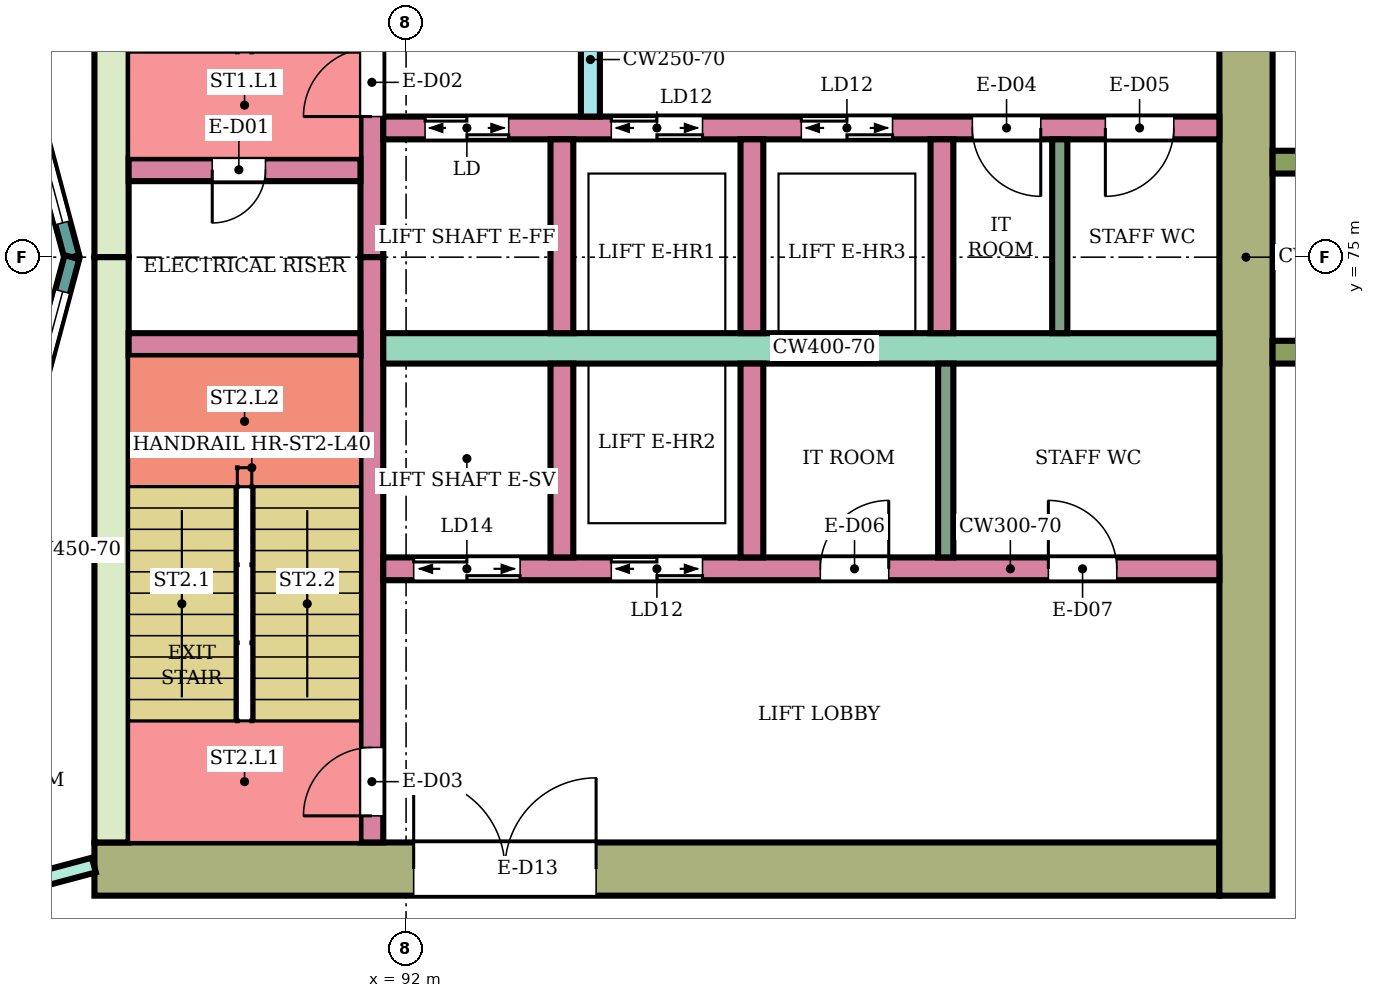
"""IFC4 building model, lengths in metres.
Left out: names, types, materials, properties, quantities, classifications, styles, units other than length and angle.
Written with IfcOpenShell. Run it as: python <this file> out.ifc"""

import sys

from ifc_helpers import new_model, si_unit, direction, frame, frame_2d, origin, place, context, subcontext, project, spatial, rectangle, extrude, element, fill, save


model = new_model("IFC4")
c1 = context("Model", 3, precision=1e-05, world=origin(), true_north=direction((0.0, 1.0)))
c2 = subcontext(c1, "Body", "Model", "MODEL_VIEW")
j1 = project(units=[si_unit("LENGTHUNIT", "METRE"), si_unit("PLANEANGLEUNIT", "RADIAN")], contexts=[c1])
p1 = place(None, origin())
s1 = spatial("IfcSite", under=j1, at=p1, CompositionType="ELEMENT")
p2 = place(p1, origin())
s2 = spatial("IfcBuilding", under=s1, at=p2, CompositionType="ELEMENT")
p3 = place(p2, frame((0.0, 0.0, 174.1)))
s3 = spatial("IfcBuildingStorey", under=s2, at=p3, CompositionType="ELEMENT", Elevation=174.1)
p4 = place(p3, frame((87.9, 66.95, 0.0), z_axis=(0.0, 0.0, 1.0), x_axis=(1.0, 0.0, 0.0)))
e1 = element("IfcWall", 1, at=p4, inside=s3, PredefinedType="SHEAR", context=c2, shape_type="SweptSolid", body=[
    extrude(rectangle(XDim=14.8, YDim=0.7, at=frame_2d((7.4, 0.0))), origin(), (0.0, 0.0, 1.0), 3.78),
])
p5 = place(p4, frame((4.2, 0.0, 0.0)))
e2 = element("IfcOpeningElement", 2, at=p5, cuts=e1, PredefinedType="OPENING", context=c2, shape_type="SweptSolid", body=[
    extrude(rectangle(XDim=2.4, YDim=2.4, at=frame_2d((1.2, 1.2))), frame((0.0, 0.36, 0.0), z_axis=(0.0, -1.0, 0.0), x_axis=(1.0, 0.0, 0.0)), (0.0, 0.0, 1.0), 0.72),
])
for number, where, z_axis, x_axis in (
    (3, (88.125, 75.0, 0.0), (0.0, 0.0, 1.0), (0.0, 1.0, 0.0)),
    (4, (88.125, 67.3, 0.0), (0.0, 0.0, 1.0), (0.0, 1.0, 0.0)),
):
    element("IfcWall", number, at=place(p3, frame(where, z_axis=z_axis, x_axis=x_axis)), inside=s3, PredefinedType="SHEAR", context=c2, shape_type="SweptSolid", body=[
        extrude(rectangle(XDim=7.7, YDim=0.45, at=frame_2d((3.85, 0.0))), origin(), (0.0, 0.0, 1.0), 3.78),
    ])
p6 = place(p3, frame((103.05, 66.6, 0.0), z_axis=(0.0, 0.0, 1.0), x_axis=(0.0, 1.0, 0.0)))
e5 = element("IfcWall", 5, at=p6, inside=s3, PredefinedType="SHEAR", context=c2, shape_type="SweptSolid", body=[
    extrude(rectangle(XDim=16.8, YDim=0.7, at=frame_2d((8.4, 0.0))), origin(), (0.0, 0.0, 1.0), 3.78),
])
p7 = place(p3, frame((91.55, 75.0, 0.0), z_axis=(0.0, 0.0, 1.0), x_axis=(0.0, 1.0, 0.0)))
e6 = element("IfcWall", 6, at=p7, inside=s3, PredefinedType="SHEAR", context=c2, shape_type="SweptSolid", body=[
    extrude(rectangle(XDim=7.7, YDim=0.3, at=frame_2d((3.85, 0.0))), origin(), (0.0, 0.0, 1.0), 3.78),
])
p8 = place(p7, frame((1.85, 0.0, 0.0)))
e7 = element("IfcOpeningElement", 7, at=p8, cuts=e6, PredefinedType="OPENING", context=c2, shape_type="SweptSolid", body=[
    extrude(rectangle(XDim=0.9, YDim=2.1, at=frame_2d((0.45, 1.05))), frame((0.0, 0.16, 0.0), z_axis=(0.0, -1.0, 0.0), x_axis=(1.0, 0.0, 0.0)), (0.0, 0.0, 1.0), 0.32),
])
p9 = place(p3, frame((91.55, 67.3, 0.0), z_axis=(0.0, 0.0, 1.0), x_axis=(0.0, 1.0, 0.0)))
e8 = element("IfcWall", 8, at=p9, inside=s3, PredefinedType="SHEAR", context=c2, shape_type="SweptSolid", body=[
    extrude(rectangle(XDim=7.7, YDim=0.3, at=frame_2d((3.85, 0.0))), origin(), (0.0, 0.0, 1.0), 3.78),
])
p10 = place(p9, frame((0.35, 0.0, 0.0)))
e9 = element("IfcOpeningElement", 9, at=p10, cuts=e8, PredefinedType="OPENING", context=c2, shape_type="SweptSolid", body=[
    extrude(rectangle(XDim=0.9, YDim=2.1, at=frame_2d((0.45, 1.05))), frame((0.0, 0.16, 0.0), z_axis=(0.0, -1.0, 0.0), x_axis=(1.0, 0.0, 0.0)), (0.0, 0.0, 1.0), 0.32),
])
p11 = place(p3, frame((88.35, 76.15, 0.0), z_axis=(0.0, 0.0, 1.0), x_axis=(1.0, 0.0, 0.0)))
e10 = element("IfcWall", 10, at=p11, inside=s3, PredefinedType="SHEAR", context=c2, shape_type="SweptSolid", body=[
    extrude(rectangle(XDim=3.05, YDim=0.3, at=frame_2d((1.525, 0.0))), origin(), (0.0, 0.0, 1.0), 3.78),
])
p12 = place(p11, frame((1.1, 0.0, 0.0)))
e11 = element("IfcOpeningElement", 11, at=p12, cuts=e10, PredefinedType="OPENING", context=c2, shape_type="SweptSolid", body=[
    extrude(rectangle(XDim=0.7, YDim=2.0, at=frame_2d((0.35, 1.0))), frame((0.0, 0.16, 0.0), z_axis=(0.0, -1.0, 0.0), x_axis=(1.0, 0.0, 0.0)), (0.0, 0.0, 1.0), 0.32),
])
p13 = place(p3, frame((88.35, 73.85, 0.0), z_axis=(0.0, 0.0, 1.0), x_axis=(1.0, 0.0, 0.0)))
e12 = element("IfcWall", 12, at=p13, inside=s3, PredefinedType="SHEAR", context=c2, shape_type="SweptSolid", body=[
    extrude(rectangle(XDim=3.05, YDim=0.3, at=frame_2d((1.525, 0.0))), origin(), (0.0, 0.0, 1.0), 3.78),
])
p14 = place(p3, frame((91.7, 76.7, 0.0), z_axis=(0.0, 0.0, 1.0), x_axis=(1.0, 0.0, 0.0)))
e13 = element("IfcWall", 13, at=p14, inside=s3, PredefinedType="SHEAR", context=c2, shape_type="SweptSolid", body=[
    extrude(rectangle(XDim=11.0, YDim=0.3, at=frame_2d((5.5, 0.0))), origin(), (0.0, 0.0, 1.0), 3.78),
])
p15 = place(p14, frame((0.55, 0.0, 0.0)))
e14 = element("IfcOpeningElement", 14, at=p15, cuts=e13, PredefinedType="OPENING", context=c2, shape_type="SweptSolid", body=[
    extrude(rectangle(XDim=1.1, YDim=2.1, at=frame_2d((0.55, 1.05))), frame((0.0, 0.16, 0.0), z_axis=(0.0, -1.0, 0.0), x_axis=(1.0, 0.0, 0.0)), (0.0, 0.0, 1.0), 0.32),
])
p16 = place(p14, frame((3.0, 0.0, 0.0)))
e15 = element("IfcOpeningElement", 15, at=p16, cuts=e13, PredefinedType="OPENING", context=c2, shape_type="SweptSolid", body=[
    extrude(rectangle(XDim=1.2, YDim=2.1, at=frame_2d((0.6, 1.05))), frame((0.0, 0.16, 0.0), z_axis=(0.0, -1.0, 0.0), x_axis=(1.0, 0.0, 0.0)), (0.0, 0.0, 1.0), 0.32),
])
p17 = place(p14, frame((5.5, 0.0, 0.0)))
e16 = element("IfcOpeningElement", 16, at=p17, cuts=e13, PredefinedType="OPENING", context=c2, shape_type="SweptSolid", body=[
    extrude(rectangle(XDim=1.2, YDim=2.1, at=frame_2d((0.6, 1.05))), frame((0.0, 0.16, 0.0), z_axis=(0.0, -1.0, 0.0), x_axis=(1.0, 0.0, 0.0)), (0.0, 0.0, 1.0), 0.32),
])
p18 = place(p14, frame((7.75, 0.0, 0.0)))
e17 = element("IfcOpeningElement", 17, at=p18, cuts=e13, PredefinedType="OPENING", context=c2, shape_type="SweptSolid", body=[
    extrude(rectangle(XDim=0.9, YDim=2.1, at=frame_2d((0.45, 1.05))), frame((0.0, 0.16, 0.0), z_axis=(0.0, -1.0, 0.0), x_axis=(1.0, 0.0, 0.0)), (0.0, 0.0, 1.0), 0.32),
])
p19 = place(p14, frame((9.5, 0.0, 0.0)))
e18 = element("IfcOpeningElement", 18, at=p19, cuts=e13, PredefinedType="OPENING", context=c2, shape_type="SweptSolid", body=[
    extrude(rectangle(XDim=0.9, YDim=2.1, at=frame_2d((0.45, 1.05))), frame((0.0, 0.16, 0.0), z_axis=(0.0, -1.0, 0.0), x_axis=(1.0, 0.0, 0.0)), (0.0, 0.0, 1.0), 0.32),
])
p20 = place(p3, frame((91.7, 73.8, 0.0), z_axis=(0.0, 0.0, 1.0), x_axis=(1.0, 0.0, 0.0)))
e19 = element("IfcWall", 19, at=p20, inside=s3, PredefinedType="SHEAR", context=c2, shape_type="SweptSolid", body=[
    extrude(rectangle(XDim=11.0, YDim=0.4, at=frame_2d((5.5, 0.0))), origin(), (0.0, 0.0, 1.0), 3.78),
])
p21 = place(p3, frame((91.7, 70.9, 0.0), z_axis=(0.0, 0.0, 1.0), x_axis=(1.0, 0.0, 0.0)))
e20 = element("IfcWall", 20, at=p21, inside=s3, PredefinedType="SHEAR", context=c2, shape_type="SweptSolid", body=[
    extrude(rectangle(XDim=11.0, YDim=0.3, at=frame_2d((5.5, 0.0))), origin(), (0.0, 0.0, 1.0), 3.78),
])
p22 = place(p21, frame((0.4, 0.0, 0.0)))
e21 = element("IfcOpeningElement", 21, at=p22, cuts=e20, PredefinedType="OPENING", context=c2, shape_type="SweptSolid", body=[
    extrude(rectangle(XDim=1.4, YDim=2.1, at=frame_2d((0.7, 1.05))), frame((0.0, 0.16, 0.0), z_axis=(0.0, -1.0, 0.0), x_axis=(1.0, 0.0, 0.0)), (0.0, 0.0, 1.0), 0.32),
])
p23 = place(p21, frame((3.0, 0.0, 0.0)))
e22 = element("IfcOpeningElement", 22, at=p23, cuts=e20, PredefinedType="OPENING", context=c2, shape_type="SweptSolid", body=[
    extrude(rectangle(XDim=1.2, YDim=2.1, at=frame_2d((0.6, 1.05))), frame((0.0, 0.16, 0.0), z_axis=(0.0, -1.0, 0.0), x_axis=(1.0, 0.0, 0.0)), (0.0, 0.0, 1.0), 0.32),
])
p24 = place(p21, frame((5.75, 0.0, 0.0)))
e23 = element("IfcOpeningElement", 23, at=p24, cuts=e20, PredefinedType="OPENING", context=c2, shape_type="SweptSolid", body=[
    extrude(rectangle(XDim=0.9, YDim=2.1, at=frame_2d((0.45, 1.05))), frame((0.0, 0.16, 0.0), z_axis=(0.0, -1.0, 0.0), x_axis=(1.0, 0.0, 0.0)), (0.0, 0.0, 1.0), 0.32),
])
p25 = place(p21, frame((8.75, 0.0, 0.0)))
e24 = element("IfcOpeningElement", 24, at=p25, cuts=e20, PredefinedType="OPENING", context=c2, shape_type="SweptSolid", body=[
    extrude(rectangle(XDim=0.9, YDim=2.1, at=frame_2d((0.45, 1.05))), frame((0.0, 0.16, 0.0), z_axis=(0.0, -1.0, 0.0), x_axis=(1.0, 0.0, 0.0)), (0.0, 0.0, 1.0), 0.32),
])
for number, where, z_axis, x_axis in (
    (25, (94.05, 74.0, 0.0), (0.0, 0.0, 1.0), (0.0, 1.0, 0.0)),
    (26, (96.55, 74.0, 0.0), (0.0, 0.0, 1.0), (0.0, 1.0, 0.0)),
    (27, (99.05, 74.0, 0.0), (0.0, 0.0, 1.0), (0.0, 1.0, 0.0)),
    (28, (94.05, 71.05, 0.0), (0.0, 0.0, 1.0), (0.0, 1.0, 0.0)),
    (29, (96.55, 71.05, 0.0), (0.0, 0.0, 1.0), (0.0, 1.0, 0.0)),
):
    element("IfcWall", number, at=place(p3, frame(where, z_axis=z_axis, x_axis=x_axis)), inside=s3, PredefinedType="SHEAR", context=c2, shape_type="SweptSolid", body=[
        extrude(rectangle(XDim=2.55, YDim=0.3, at=frame_2d((1.275, 0.0))), origin(), (0.0, 0.0, 1.0), 3.78),
    ])
p26 = place(p3, frame((94.425, 76.85, 0.0), z_axis=(0.0, 0.0, 1.0), x_axis=(0.0, 1.0, 0.0)))
e30 = element("IfcWall", 30, at=p26, inside=s3, PredefinedType="SHEAR", context=c2, shape_type="SweptSolid", body=[
    extrude(rectangle(XDim=1.5, YDim=0.25, at=frame_2d((0.75, 0.0))), origin(), (0.0, 0.0, 1.0), 3.78),
])
for number, where, z_axis, x_axis in (
    (31, (103.4, 73.75, 0.0), (0.0, 0.0, 1.0), (1.0, 0.0, 0.0)),
    (32, (103.4, 76.25, 0.0), (0.0, 0.0, 1.0), (1.0, 0.0, 0.0)),
):
    element("IfcWall", number, at=place(p3, frame(where, z_axis=z_axis, x_axis=x_axis)), inside=s3, PredefinedType="NOTDEFINED", context=c2, shape_type="SweptSolid", body=[
        extrude(rectangle(XDim=2.416, YDim=0.3, at=frame_2d((1.208, 0.0))), origin(), (0.0, 0.0, 1.0), 4.1),
    ])
p27 = place(p3, frame((87.604, 75.0, 0.0), z_axis=(0.0, 0.0, 1.0), x_axis=(-0.258789828301, 0.965933654434, 0.0)))
e33 = element("IfcWall", 33, at=p27, inside=s3, PredefinedType="NOTDEFINED", context=c2, shape_type="SweptSolid", body=[
    extrude(rectangle(XDim=3.936, YDim=0.2, at=frame_2d((1.968, 0.0))), origin(), (0.0, 0.0, 1.0), 4.1),
])
p28 = place(p27, frame((0.468, 0.0, 0.9)))
e34 = element("IfcOpeningElement", 34, at=p28, cuts=e33, PredefinedType="OPENING", context=c2, shape_type="SweptSolid", body=[
    extrude(rectangle(XDim=3.0, YDim=2.3, at=frame_2d((1.5, 1.15))), frame((0.0, 0.11, 0.0), z_axis=(0.0, -1.0, 0.0), x_axis=(1.0, 0.0, 0.0)), (0.0, 0.0, 1.0), 0.22),
])
p29 = place(p3, frame((86.585, 71.198, 0.0), z_axis=(0.0, 0.0, 1.0), x_axis=(0.258789828301, 0.965933654434, 0.0)))
e35 = element("IfcWall", 35, at=p29, inside=s3, PredefinedType="NOTDEFINED", context=c2, shape_type="SweptSolid", body=[
    extrude(rectangle(XDim=3.936, YDim=0.2, at=frame_2d((1.968, 0.0))), origin(), (0.0, 0.0, 1.0), 4.1),
])
p30 = place(p29, frame((0.468, 0.0, 0.9)))
e36 = element("IfcOpeningElement", 36, at=p30, cuts=e35, PredefinedType="OPENING", context=c2, shape_type="SweptSolid", body=[
    extrude(rectangle(XDim=3.0, YDim=2.3, at=frame_2d((1.5, 1.15))), frame((0.0, 0.11, 0.0), z_axis=(0.0, -1.0, 0.0), x_axis=(1.0, 0.0, 0.0)), (0.0, 0.0, 1.0), 0.22),
])
p31 = place(p3, frame((80.0, 64.898, 0.0), z_axis=(0.0, 0.0, 1.0), x_axis=(0.966237419782, 0.257653349704, 0.0)))
e37 = element("IfcWall", 37, at=p31, inside=s3, PredefinedType="PARTITIONING", context=c2, shape_type="SweptSolid", body=[
    extrude(rectangle(XDim=8.169, YDim=0.2, at=frame_2d((4.084, 0.0))), origin(), (0.0, 0.0, 1.0), 3.65),
])
p32 = place(p31, frame((6.428, 0.0, 0.0)))
e38 = element("IfcOpeningElement", 38, at=p32, cuts=e37, PredefinedType="OPENING", context=c2, shape_type="SweptSolid", body=[
    extrude(rectangle(XDim=0.9, YDim=2.1, at=frame_2d((0.45, 1.05))), frame((0.0, 0.11, 0.0), z_axis=(0.0, -1.0, 0.0), x_axis=(1.0, 0.0, 0.0)), (0.0, 0.0, 1.0), 0.22),
])
for number, where, z_axis, x_axis in (
    (39, (100.6, 74.0, 0.0), (0.0, 0.0, 1.0), (0.0, 1.0, 0.0)),
    (40, (99.1, 71.05, 0.0), (0.0, 0.0, 1.0), (0.0, 1.0, 0.0)),
):
    element("IfcWall", number, at=place(p3, frame(where, z_axis=z_axis, x_axis=x_axis)), inside=s3, PredefinedType="PARTITIONING", context=c2, shape_type="SweptSolid", body=[
        extrude(rectangle(XDim=2.55, YDim=0.2, at=frame_2d((1.275, 0.0))), origin(), (0.0, 0.0, 1.0), 3.78),
    ])
p33 = place(p28, origin())
e41 = element("IfcWindow", 41, at=p33, inside=s3, PartitioningType="SINGLE_PANEL", PredefinedType="WINDOW", context=c2, shape_type="SweptSolid", body=[
    extrude(rectangle(XDim=3.0, YDim=2.3, at=frame_2d((1.5, 1.15))), frame((0.0, 0.03, 0.0), z_axis=(0.0, -1.0, 0.0), x_axis=(1.0, 0.0, 0.0)), (0.0, 0.0, 1.0), 0.06),
])
fill(e34, e41)
p34 = place(p30, origin())
e42 = element("IfcWindow", 42, at=p34, inside=s3, PartitioningType="SINGLE_PANEL", PredefinedType="WINDOW", context=c2, shape_type="SweptSolid", body=[
    extrude(rectangle(XDim=3.0, YDim=2.3, at=frame_2d((1.5, 1.15))), frame((0.0, 0.03, 0.0), z_axis=(0.0, -1.0, 0.0), x_axis=(1.0, 0.0, 0.0)), (0.0, 0.0, 1.0), 0.06),
])
fill(e36, e42)
p35 = place(p12, frame((0.7, 0.0, 0.0), z_axis=(0.0, 0.0, 1.0), x_axis=(-1.0, 0.0, 0.0)))
e43 = element("IfcDoor", 43, at=p35, inside=s3, OperationType="SINGLE_SWING_RIGHT", PredefinedType="DOOR", context=c2, shape_type="SweptSolid", body=[
    extrude(rectangle(XDim=0.7, YDim=2.0, at=frame_2d((0.35, 1.0))), frame((0.0, 0.025, 0.0), z_axis=(0.0, -1.0, 0.0), x_axis=(1.0, 0.0, 0.0)), (0.0, 0.0, 1.0), 0.05),
])
fill(e11, e43)
p36 = place(p8, origin())
e44 = element("IfcDoor", 44, at=p36, inside=s3, OperationType="SINGLE_SWING_LEFT", PredefinedType="DOOR", context=c2, shape_type="SweptSolid", body=[
    extrude(rectangle(XDim=0.9, YDim=2.1, at=frame_2d((0.45, 1.05))), frame((0.0, 0.025, 0.0), z_axis=(0.0, -1.0, 0.0), x_axis=(1.0, 0.0, 0.0)), (0.0, 0.0, 1.0), 0.05),
])
fill(e7, e44)
p37 = place(p10, origin())
e45 = element("IfcDoor", 45, at=p37, inside=s3, OperationType="SINGLE_SWING_LEFT", PredefinedType="DOOR", context=c2, shape_type="SweptSolid", body=[
    extrude(rectangle(XDim=0.9, YDim=2.1, at=frame_2d((0.45, 1.05))), frame((0.0, 0.025, 0.0), z_axis=(0.0, -1.0, 0.0), x_axis=(1.0, 0.0, 0.0)), (0.0, 0.0, 1.0), 0.05),
])
fill(e9, e45)
p38 = place(p15, origin())
e46 = element("IfcDoor", 46, at=p38, inside=s3, OperationType="DOUBLE_DOOR_SLIDING", PredefinedType="DOOR", context=c2, shape_type="SweptSolid", body=[
    extrude(rectangle(XDim=1.1, YDim=2.1, at=frame_2d((0.55, 1.05))), frame((0.0, 0.025, 0.0), z_axis=(0.0, -1.0, 0.0), x_axis=(1.0, 0.0, 0.0)), (0.0, 0.0, 1.0), 0.05),
])
fill(e14, e46)
p39 = place(p16, origin())
e47 = element("IfcDoor", 47, at=p39, inside=s3, OperationType="DOUBLE_DOOR_SLIDING", PredefinedType="DOOR", context=c2, shape_type="SweptSolid", body=[
    extrude(rectangle(XDim=1.2, YDim=2.1, at=frame_2d((0.6, 1.05))), frame((0.0, 0.025, 0.0), z_axis=(0.0, -1.0, 0.0), x_axis=(1.0, 0.0, 0.0)), (0.0, 0.0, 1.0), 0.05),
])
fill(e15, e47)
p40 = place(p17, origin())
e48 = element("IfcDoor", 48, at=p40, inside=s3, OperationType="DOUBLE_DOOR_SLIDING", PredefinedType="DOOR", context=c2, shape_type="SweptSolid", body=[
    extrude(rectangle(XDim=1.2, YDim=2.1, at=frame_2d((0.6, 1.05))), frame((0.0, 0.025, 0.0), z_axis=(0.0, -1.0, 0.0), x_axis=(1.0, 0.0, 0.0)), (0.0, 0.0, 1.0), 0.05),
])
fill(e16, e48)
p41 = place(p18, frame((0.9, 0.0, 0.0), z_axis=(0.0, 0.0, 1.0), x_axis=(-1.0, 0.0, 0.0)))
e49 = element("IfcDoor", 49, at=p41, inside=s3, OperationType="SINGLE_SWING_LEFT", PredefinedType="DOOR", context=c2, shape_type="SweptSolid", body=[
    extrude(rectangle(XDim=0.9, YDim=2.1, at=frame_2d((0.45, 1.05))), frame((0.0, 0.025, 0.0), z_axis=(0.0, -1.0, 0.0), x_axis=(1.0, 0.0, 0.0)), (0.0, 0.0, 1.0), 0.05),
])
fill(e17, e49)
p42 = place(p19, frame((0.9, 0.0, 0.0), z_axis=(0.0, 0.0, 1.0), x_axis=(-1.0, 0.0, 0.0)))
e50 = element("IfcDoor", 50, at=p42, inside=s3, OperationType="SINGLE_SWING_RIGHT", PredefinedType="DOOR", context=c2, shape_type="SweptSolid", body=[
    extrude(rectangle(XDim=0.9, YDim=2.1, at=frame_2d((0.45, 1.05))), frame((0.0, 0.025, 0.0), z_axis=(0.0, -1.0, 0.0), x_axis=(1.0, 0.0, 0.0)), (0.0, 0.0, 1.0), 0.05),
])
fill(e18, e50)
p43 = place(p22, origin())
e51 = element("IfcDoor", 51, at=p43, inside=s3, OperationType="DOUBLE_DOOR_SLIDING", PredefinedType="DOOR", context=c2, shape_type="SweptSolid", body=[
    extrude(rectangle(XDim=1.4, YDim=2.1, at=frame_2d((0.7, 1.05))), frame((0.0, 0.025, 0.0), z_axis=(0.0, -1.0, 0.0), x_axis=(1.0, 0.0, 0.0)), (0.0, 0.0, 1.0), 0.05),
])
fill(e21, e51)
p44 = place(p23, origin())
e52 = element("IfcDoor", 52, at=p44, inside=s3, OperationType="DOUBLE_DOOR_SLIDING", PredefinedType="DOOR", context=c2, shape_type="SweptSolid", body=[
    extrude(rectangle(XDim=1.2, YDim=2.1, at=frame_2d((0.6, 1.05))), frame((0.0, 0.025, 0.0), z_axis=(0.0, -1.0, 0.0), x_axis=(1.0, 0.0, 0.0)), (0.0, 0.0, 1.0), 0.05),
])
fill(e22, e52)
p45 = place(p24, origin())
e53 = element("IfcDoor", 53, at=p45, inside=s3, OperationType="SINGLE_SWING_RIGHT", PredefinedType="DOOR", context=c2, shape_type="SweptSolid", body=[
    extrude(rectangle(XDim=0.9, YDim=2.1, at=frame_2d((0.45, 1.05))), frame((0.0, 0.025, 0.0), z_axis=(0.0, -1.0, 0.0), x_axis=(1.0, 0.0, 0.0)), (0.0, 0.0, 1.0), 0.05),
])
fill(e23, e53)
p46 = place(p25, origin())
e54 = element("IfcDoor", 54, at=p46, inside=s3, OperationType="SINGLE_SWING_LEFT", PredefinedType="DOOR", context=c2, shape_type="SweptSolid", body=[
    extrude(rectangle(XDim=0.9, YDim=2.1, at=frame_2d((0.45, 1.05))), frame((0.0, 0.025, 0.0), z_axis=(0.0, -1.0, 0.0), x_axis=(1.0, 0.0, 0.0)), (0.0, 0.0, 1.0), 0.05),
])
fill(e24, e54)
p47 = place(p5, origin())
e55 = element("IfcDoor", 55, at=p47, inside=s3, OperationType="DOUBLE_DOOR_SINGLE_SWING", PredefinedType="DOOR", context=c2, shape_type="SweptSolid", body=[
    extrude(rectangle(XDim=2.4, YDim=2.4, at=frame_2d((1.2, 1.2))), frame((0.0, 0.025, 0.0), z_axis=(0.0, -1.0, 0.0), x_axis=(1.0, 0.0, 0.0)), (0.0, 0.0, 1.0), 0.05),
])
fill(e2, e55)
save(model, sys.argv[1])
